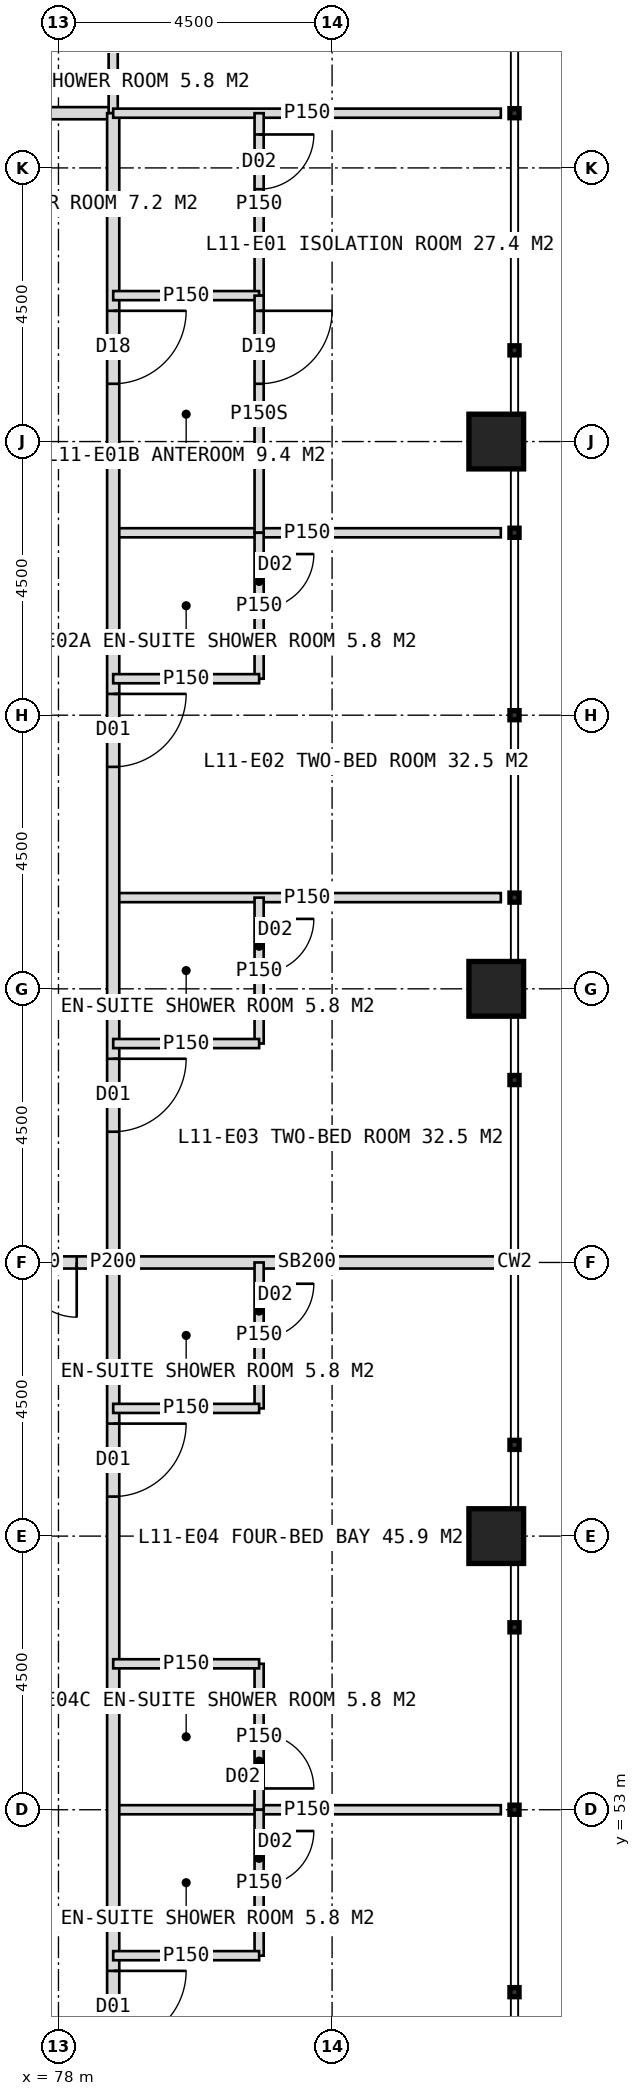
"""IFC4 building model, lengths in metres.
Left out: names, types, materials, properties, quantities, classifications, styles, units other than length and angle.
Written with IfcOpenShell. Run it as: python <this file> out.ifc"""

import sys

from ifc_helpers import new_model, si_unit, direction, frame, frame_2d, origin, origin_2d, place, context, subcontext, project, spatial, rectangle, hollow_rectangle, extrude, element, fill, save


model = new_model("IFC4")
c1 = context("Model", 3, precision=1e-05, world=origin(), true_north=direction((0.0, 1.0)))
c2 = subcontext(c1, "Body", "Model", "MODEL_VIEW")
j1 = project(units=[si_unit("LENGTHUNIT", "METRE"), si_unit("PLANEANGLEUNIT", "RADIAN")], contexts=[c1])
p1 = place(None, origin())
s1 = spatial("IfcSite", under=j1, at=p1, CompositionType="ELEMENT")
p2 = place(p1, origin())
s2 = spatial("IfcBuilding", under=s1, at=p2, CompositionType="ELEMENT")
p3 = place(p2, frame((0.0, 0.0, 51.0)))
s3 = spatial("IfcBuildingStorey", under=s2, at=p3, CompositionType="ELEMENT", Elevation=51.0)
for number, where, z_axis, x_axis in (
    (1, (85.2, 57.5, 0.0), (0.0, 0.0, 1.0), (1.0, 0.0, 0.0)),
    (2, (85.2, 66.5, 0.0), (0.0, 0.0, 1.0), (1.0, 0.0, 0.0)),
    (3, (85.2, 75.5, 0.0), (0.0, 0.0, 1.0), (1.0, 0.0, 0.0)),
):
    element("IfcColumn", number, at=place(p3, frame(where, z_axis=z_axis, x_axis=x_axis)), inside=s3, PredefinedType="COLUMN", context=c2, shape_type="SweptSolid", body=[
        extrude(hollow_rectangle(XDim=0.9, YDim=0.9, WallThickness=0.08, at=origin_2d()), origin(), (0.0, 0.0, 1.0), 4.0),
    ])
p4 = place(p3, frame((41.1, 80.9, 0.0), z_axis=(0.0, 0.0, 1.0), x_axis=(1.0, 0.0, 0.0)))
e4 = element("IfcWall", 4, at=p4, inside=s3, PredefinedType="PARTITIONING", context=c2, shape_type="SweptSolid", body=[
    extrude(rectangle(XDim=37.8, YDim=0.2, at=frame_2d((18.9, 0.0))), origin(), (0.0, 0.0, 1.0), 3.75),
])
p5 = place(p4, frame((3.25, 0.0, 0.0)))
e5 = element("IfcOpeningElement", 5, at=p5, cuts=e4, PredefinedType="OPENING", context=c2, shape_type="SweptSolid", body=[
    extrude(rectangle(XDim=1.2, YDim=2.2, at=frame_2d((0.6, 1.1))), frame((0.0, 0.11, 0.0), z_axis=(0.0, -1.0, 0.0), x_axis=(1.0, 0.0, 0.0)), (0.0, 0.0, 1.0), 0.22),
])
p6 = place(p4, frame((9.55, 0.0, 0.0)))
e6 = element("IfcOpeningElement", 6, at=p6, cuts=e4, PredefinedType="OPENING", context=c2, shape_type="SweptSolid", body=[
    extrude(rectangle(XDim=1.2, YDim=2.2, at=frame_2d((0.6, 1.1))), frame((0.0, 0.11, 0.0), z_axis=(0.0, -1.0, 0.0), x_axis=(1.0, 0.0, 0.0)), (0.0, 0.0, 1.0), 0.22),
])
p7 = place(p4, frame((15.55, 0.0, 0.0)))
e7 = element("IfcOpeningElement", 7, at=p7, cuts=e4, PredefinedType="OPENING", context=c2, shape_type="SweptSolid", body=[
    extrude(rectangle(XDim=1.2, YDim=2.2, at=frame_2d((0.6, 1.1))), frame((0.0, 0.11, 0.0), z_axis=(0.0, -1.0, 0.0), x_axis=(1.0, 0.0, 0.0)), (0.0, 0.0, 1.0), 0.22),
])
p8 = place(p4, frame((21.4, 0.0, 0.0)))
e8 = element("IfcOpeningElement", 8, at=p8, cuts=e4, PredefinedType="OPENING", context=c2, shape_type="SweptSolid", body=[
    extrude(rectangle(XDim=1.0, YDim=2.1, at=frame_2d((0.5, 1.05))), frame((0.0, 0.11, 0.0), z_axis=(0.0, -1.0, 0.0), x_axis=(1.0, 0.0, 0.0)), (0.0, 0.0, 1.0), 0.22),
])
p9 = place(p4, frame((27.55, 0.0, 0.0)))
e9 = element("IfcOpeningElement", 9, at=p9, cuts=e4, PredefinedType="OPENING", context=c2, shape_type="SweptSolid", body=[
    extrude(rectangle(XDim=1.2, YDim=2.2, at=frame_2d((0.6, 1.1))), frame((0.0, 0.11, 0.0), z_axis=(0.0, -1.0, 0.0), x_axis=(1.0, 0.0, 0.0)), (0.0, 0.0, 1.0), 0.22),
])
p10 = place(p3, frame((78.9, 80.9, 0.0), z_axis=(0.0, 0.0, 1.0), x_axis=(0.0, 1.0, 0.0)))
e10 = element("IfcWall", 10, at=p10, inside=s3, PredefinedType="PARTITIONING", context=c2, shape_type="SweptSolid", body=[
    extrude(rectangle(XDim=2.4, YDim=0.15, at=frame_2d((1.2, 0.0))), origin(), (0.0, 0.0, 1.0), 3.75),
])
for number, where, z_axis, x_axis in (
    (11, (78.9, 74.0, 0.0), (0.0, 0.0, 1.0), (1.0, 0.0, 0.0)),
    (12, (78.9, 68.0, 0.0), (0.0, 0.0, 1.0), (1.0, 0.0, 0.0)),
):
    element("IfcWall", number, at=place(p3, frame(where, z_axis=z_axis, x_axis=x_axis)), inside=s3, PredefinedType="PARTITIONING", context=c2, shape_type="SweptSolid", body=[
        extrude(rectangle(XDim=6.375, YDim=0.15, at=frame_2d((3.188, 0.0))), origin(), (0.0, 0.0, 1.0), 3.75),
    ])
p11 = place(p3, frame((78.9, 62.0, 0.0), z_axis=(0.0, 0.0, 1.0), x_axis=(1.0, 0.0, 0.0)))
e13 = element("IfcWall", 13, at=p11, inside=s3, PredefinedType="SOLIDWALL", context=c2, shape_type="SweptSolid", body=[
    extrude(rectangle(XDim=6.375, YDim=0.2, at=frame_2d((3.188, 0.0))), origin(), (0.0, 0.0, 1.0), 2.75),
])
p12 = place(p3, frame((78.9, 53.0, 0.0), z_axis=(0.0, 0.0, 1.0), x_axis=(1.0, 0.0, 0.0)))
e14 = element("IfcWall", 14, at=p12, inside=s3, PredefinedType="PARTITIONING", context=c2, shape_type="SweptSolid", body=[
    extrude(rectangle(XDim=6.375, YDim=0.15, at=frame_2d((3.188, 0.0))), origin(), (0.0, 0.0, 1.0), 3.75),
])
p13 = place(p3, frame((78.9, 80.9, 0.0), z_axis=(0.0, 0.0, 1.0), x_axis=(0.0, -1.0, 0.0)))
e15 = element("IfcWall", 15, at=p13, inside=s3, PredefinedType="PARTITIONING", context=c2, shape_type="SweptSolid", body=[
    extrude(rectangle(XDim=37.8, YDim=0.2, at=frame_2d((18.9, 0.0))), origin(), (0.0, 0.0, 1.0), 3.75),
])
p14 = place(p13, frame((3.25, 0.0, 0.0)))
e16 = element("IfcOpeningElement", 16, at=p14, cuts=e15, PredefinedType="OPENING", context=c2, shape_type="SweptSolid", body=[
    extrude(rectangle(XDim=1.2, YDim=2.2, at=frame_2d((0.6, 1.1))), frame((0.0, 0.11, 0.0), z_axis=(0.0, -1.0, 0.0), x_axis=(1.0, 0.0, 0.0)), (0.0, 0.0, 1.0), 0.22),
])
p15 = place(p13, frame((9.55, 0.0, 0.0)))
e17 = element("IfcOpeningElement", 17, at=p15, cuts=e15, PredefinedType="OPENING", context=c2, shape_type="SweptSolid", body=[
    extrude(rectangle(XDim=1.2, YDim=2.2, at=frame_2d((0.6, 1.1))), frame((0.0, 0.11, 0.0), z_axis=(0.0, -1.0, 0.0), x_axis=(1.0, 0.0, 0.0)), (0.0, 0.0, 1.0), 0.22),
])
p16 = place(p13, frame((15.55, 0.0, 0.0)))
e18 = element("IfcOpeningElement", 18, at=p16, cuts=e15, PredefinedType="OPENING", context=c2, shape_type="SweptSolid", body=[
    extrude(rectangle(XDim=1.2, YDim=2.2, at=frame_2d((0.6, 1.1))), frame((0.0, 0.11, 0.0), z_axis=(0.0, -1.0, 0.0), x_axis=(1.0, 0.0, 0.0)), (0.0, 0.0, 1.0), 0.22),
])
p17 = place(p13, frame((21.55, 0.0, 0.0)))
e19 = element("IfcOpeningElement", 19, at=p17, cuts=e15, PredefinedType="OPENING", context=c2, shape_type="SweptSolid", body=[
    extrude(rectangle(XDim=1.2, YDim=2.2, at=frame_2d((0.6, 1.1))), frame((0.0, 0.11, 0.0), z_axis=(0.0, -1.0, 0.0), x_axis=(1.0, 0.0, 0.0)), (0.0, 0.0, 1.0), 0.22),
])
p18 = place(p13, frame((30.55, 0.0, 0.0)))
e20 = element("IfcOpeningElement", 20, at=p18, cuts=e15, PredefinedType="OPENING", context=c2, shape_type="SweptSolid", body=[
    extrude(rectangle(XDim=1.2, YDim=2.2, at=frame_2d((0.6, 1.1))), frame((0.0, 0.11, 0.0), z_axis=(0.0, -1.0, 0.0), x_axis=(1.0, 0.0, 0.0)), (0.0, 0.0, 1.0), 0.22),
])
p19 = place(p3, frame((78.9, 80.9, 0.0), z_axis=(0.0, 0.0, 1.0), x_axis=(1.0, 0.0, 0.0)))
e21 = element("IfcWall", 21, at=p19, inside=s3, PredefinedType="PARTITIONING", context=c2, shape_type="SweptSolid", body=[
    extrude(rectangle(XDim=6.375, YDim=0.15, at=frame_2d((3.188, 0.0))), origin(), (0.0, 0.0, 1.0), 3.75),
])
p20 = place(p3, frame((81.3, 80.9, 0.0), z_axis=(0.0, 0.0, 1.0), x_axis=(0.0, -1.0, 0.0)))
e22 = element("IfcWall", 22, at=p20, inside=s3, PredefinedType="PARTITIONING", context=c2, shape_type="SweptSolid", body=[
    extrude(rectangle(XDim=3.0, YDim=0.15, at=frame_2d((1.5, 0.0))), origin(), (0.0, 0.0, 1.0), 3.75),
])
p21 = place(p20, frame((0.35, 0.0, 0.0)))
e23 = element("IfcOpeningElement", 23, at=p21, cuts=e22, PredefinedType="OPENING", context=c2, shape_type="SweptSolid", body=[
    extrude(rectangle(XDim=0.9, YDim=2.1, at=frame_2d((0.45, 1.05))), frame((0.0, 0.085, 0.0), z_axis=(0.0, -1.0, 0.0), x_axis=(1.0, 0.0, 0.0)), (0.0, 0.0, 1.0), 0.17),
])
p22 = place(p3, frame((78.9, 77.9, 0.0), z_axis=(0.0, 0.0, 1.0), x_axis=(1.0, 0.0, 0.0)))
e24 = element("IfcWall", 24, at=p22, inside=s3, PredefinedType="PARTITIONING", context=c2, shape_type="SweptSolid", body=[
    extrude(rectangle(XDim=2.4, YDim=0.15, at=frame_2d((1.2, 0.0))), origin(), (0.0, 0.0, 1.0), 3.75),
])
p23 = place(p3, frame((81.3, 77.9, 0.0), z_axis=(0.0, 0.0, 1.0), x_axis=(0.0, -1.0, 0.0)))
e25 = element("IfcWall", 25, at=p23, inside=s3, PredefinedType="PARTITIONING", context=c2, shape_type="SweptSolid", body=[
    extrude(rectangle(XDim=3.9, YDim=0.15, at=frame_2d((1.95, 0.0))), origin(), (0.0, 0.0, 1.0), 3.75),
])
p24 = place(p23, frame((0.25, 0.0, 0.0)))
e26 = element("IfcOpeningElement", 26, at=p24, cuts=e25, PredefinedType="OPENING", context=c2, shape_type="SweptSolid", body=[
    extrude(rectangle(XDim=1.2, YDim=2.2, at=frame_2d((0.6, 1.1))), frame((0.0, 0.085, 0.0), z_axis=(0.0, -1.0, 0.0), x_axis=(1.0, 0.0, 0.0)), (0.0, 0.0, 1.0), 0.17),
])
p25 = place(p3, frame((81.3, 74.0, 0.0), z_axis=(0.0, 0.0, 1.0), x_axis=(0.0, -1.0, 0.0)))
e27 = element("IfcWall", 27, at=p25, inside=s3, PredefinedType="PARTITIONING", context=c2, shape_type="SweptSolid", body=[
    extrude(rectangle(XDim=2.4, YDim=0.15, at=frame_2d((1.2, 0.0))), origin(), (0.0, 0.0, 1.0), 3.75),
])
p26 = place(p25, frame((0.35, 0.0, 0.0)))
e28 = element("IfcOpeningElement", 28, at=p26, cuts=e27, PredefinedType="OPENING", context=c2, shape_type="SweptSolid", body=[
    extrude(rectangle(XDim=0.9, YDim=2.1, at=frame_2d((0.45, 1.05))), frame((0.0, 0.085, 0.0), z_axis=(0.0, -1.0, 0.0), x_axis=(1.0, 0.0, 0.0)), (0.0, 0.0, 1.0), 0.17),
])
p27 = place(p3, frame((78.9, 71.6, 0.0), z_axis=(0.0, 0.0, 1.0), x_axis=(1.0, 0.0, 0.0)))
e29 = element("IfcWall", 29, at=p27, inside=s3, PredefinedType="PARTITIONING", context=c2, shape_type="SweptSolid", body=[
    extrude(rectangle(XDim=2.4, YDim=0.15, at=frame_2d((1.2, 0.0))), origin(), (0.0, 0.0, 1.0), 3.75),
])
p28 = place(p3, frame((81.3, 68.0, 0.0), z_axis=(0.0, 0.0, 1.0), x_axis=(0.0, -1.0, 0.0)))
e30 = element("IfcWall", 30, at=p28, inside=s3, PredefinedType="PARTITIONING", context=c2, shape_type="SweptSolid", body=[
    extrude(rectangle(XDim=2.4, YDim=0.15, at=frame_2d((1.2, 0.0))), origin(), (0.0, 0.0, 1.0), 3.75),
])
p29 = place(p28, frame((0.35, 0.0, 0.0)))
e31 = element("IfcOpeningElement", 31, at=p29, cuts=e30, PredefinedType="OPENING", context=c2, shape_type="SweptSolid", body=[
    extrude(rectangle(XDim=0.9, YDim=2.1, at=frame_2d((0.45, 1.05))), frame((0.0, 0.085, 0.0), z_axis=(0.0, -1.0, 0.0), x_axis=(1.0, 0.0, 0.0)), (0.0, 0.0, 1.0), 0.17),
])
p30 = place(p3, frame((78.9, 65.6, 0.0), z_axis=(0.0, 0.0, 1.0), x_axis=(1.0, 0.0, 0.0)))
e32 = element("IfcWall", 32, at=p30, inside=s3, PredefinedType="PARTITIONING", context=c2, shape_type="SweptSolid", body=[
    extrude(rectangle(XDim=2.4, YDim=0.15, at=frame_2d((1.2, 0.0))), origin(), (0.0, 0.0, 1.0), 3.75),
])
p31 = place(p3, frame((81.3, 62.0, 0.0), z_axis=(0.0, 0.0, 1.0), x_axis=(0.0, -1.0, 0.0)))
e33 = element("IfcWall", 33, at=p31, inside=s3, PredefinedType="PARTITIONING", context=c2, shape_type="SweptSolid", body=[
    extrude(rectangle(XDim=2.4, YDim=0.15, at=frame_2d((1.2, 0.0))), origin(), (0.0, 0.0, 1.0), 3.75),
])
p32 = place(p31, frame((0.35, 0.0, 0.0)))
e34 = element("IfcOpeningElement", 34, at=p32, cuts=e33, PredefinedType="OPENING", context=c2, shape_type="SweptSolid", body=[
    extrude(rectangle(XDim=0.9, YDim=2.1, at=frame_2d((0.45, 1.05))), frame((0.0, 0.085, 0.0), z_axis=(0.0, -1.0, 0.0), x_axis=(1.0, 0.0, 0.0)), (0.0, 0.0, 1.0), 0.17),
])
p33 = place(p3, frame((78.9, 59.6, 0.0), z_axis=(0.0, 0.0, 1.0), x_axis=(1.0, 0.0, 0.0)))
e35 = element("IfcWall", 35, at=p33, inside=s3, PredefinedType="PARTITIONING", context=c2, shape_type="SweptSolid", body=[
    extrude(rectangle(XDim=2.4, YDim=0.15, at=frame_2d((1.2, 0.0))), origin(), (0.0, 0.0, 1.0), 3.75),
])
p34 = place(p3, frame((81.3, 55.4, 0.0), z_axis=(0.0, 0.0, 1.0), x_axis=(0.0, -1.0, 0.0)))
e36 = element("IfcWall", 36, at=p34, inside=s3, PredefinedType="PARTITIONING", context=c2, shape_type="SweptSolid", body=[
    extrude(rectangle(XDim=2.4, YDim=0.15, at=frame_2d((1.2, 0.0))), origin(), (0.0, 0.0, 1.0), 3.75),
])
p35 = place(p34, frame((1.15, 0.0, 0.0)))
e37 = element("IfcOpeningElement", 37, at=p35, cuts=e36, PredefinedType="OPENING", context=c2, shape_type="SweptSolid", body=[
    extrude(rectangle(XDim=0.9, YDim=2.1, at=frame_2d((0.45, 1.05))), frame((0.0, 0.085, 0.0), z_axis=(0.0, -1.0, 0.0), x_axis=(1.0, 0.0, 0.0)), (0.0, 0.0, 1.0), 0.17),
])
p36 = place(p3, frame((78.9, 55.4, 0.0), z_axis=(0.0, 0.0, 1.0), x_axis=(1.0, 0.0, 0.0)))
e38 = element("IfcWall", 38, at=p36, inside=s3, PredefinedType="PARTITIONING", context=c2, shape_type="SweptSolid", body=[
    extrude(rectangle(XDim=2.4, YDim=0.15, at=frame_2d((1.2, 0.0))), origin(), (0.0, 0.0, 1.0), 3.75),
])
p37 = place(p3, frame((81.3, 53.0, 0.0), z_axis=(0.0, 0.0, 1.0), x_axis=(0.0, -1.0, 0.0)))
e39 = element("IfcWall", 39, at=p37, inside=s3, PredefinedType="PARTITIONING", context=c2, shape_type="SweptSolid", body=[
    extrude(rectangle(XDim=2.4, YDim=0.15, at=frame_2d((1.2, 0.0))), origin(), (0.0, 0.0, 1.0), 3.75),
])
p38 = place(p37, frame((0.35, 0.0, 0.0)))
e40 = element("IfcOpeningElement", 40, at=p38, cuts=e39, PredefinedType="OPENING", context=c2, shape_type="SweptSolid", body=[
    extrude(rectangle(XDim=0.9, YDim=2.1, at=frame_2d((0.45, 1.05))), frame((0.0, 0.085, 0.0), z_axis=(0.0, -1.0, 0.0), x_axis=(1.0, 0.0, 0.0)), (0.0, 0.0, 1.0), 0.17),
])
p39 = place(p3, frame((78.9, 50.6, 0.0), z_axis=(0.0, 0.0, 1.0), x_axis=(1.0, 0.0, 0.0)))
e41 = element("IfcWall", 41, at=p39, inside=s3, PredefinedType="PARTITIONING", context=c2, shape_type="SweptSolid", body=[
    extrude(rectangle(XDim=2.4, YDim=0.15, at=frame_2d((1.2, 0.0))), origin(), (0.0, 0.0, 1.0), 3.75),
])
p40 = place(p3, frame((76.2, 62.0, 0.0), z_axis=(0.0, 0.0, 1.0), x_axis=(1.0, 0.0, 0.0)))
e42 = element("IfcWall", 42, at=p40, inside=s3, PredefinedType="SOLIDWALL", context=c2, shape_type="SweptSolid", body=[
    extrude(rectangle(XDim=2.7, YDim=0.2, at=frame_2d((1.35, 0.0))), origin(), (0.0, 0.0, 1.0), 2.75),
])
p41 = place(p40, frame((0.3, 0.0, 0.0)))
e43 = element("IfcOpeningElement", 43, at=p41, cuts=e42, PredefinedType="OPENING", context=c2, shape_type="SweptSolid", body=[
    extrude(rectangle(XDim=1.8, YDim=2.2, at=frame_2d((0.9, 1.1))), frame((0.0, 0.11, 0.0), z_axis=(0.0, -1.0, 0.0), x_axis=(1.0, 0.0, 0.0)), (0.0, 0.0, 1.0), 0.22),
])
p42 = place(p24, origin())
e44 = element("IfcDoor", 44, at=p42, inside=s3, OperationType="SINGLE_SWING_LEFT", PredefinedType="DOOR", context=c2, shape_type="SweptSolid", body=[
    extrude(rectangle(XDim=1.2, YDim=2.2, at=frame_2d((0.6, 1.1))), frame((0.0, 0.025, 0.0), z_axis=(0.0, -1.0, 0.0), x_axis=(1.0, 0.0, 0.0)), (0.0, 0.0, 1.0), 0.05),
])
fill(e26, e44)
p43 = place(p14, origin())
e45 = element("IfcDoor", 45, at=p43, inside=s3, OperationType="SINGLE_SWING_LEFT", PredefinedType="DOOR", context=c2, shape_type="SweptSolid", body=[
    extrude(rectangle(XDim=1.2, YDim=2.2, at=frame_2d((0.6, 1.1))), frame((0.0, 0.025, 0.0), z_axis=(0.0, -1.0, 0.0), x_axis=(1.0, 0.0, 0.0)), (0.0, 0.0, 1.0), 0.05),
])
fill(e16, e45)
p44 = place(p21, origin())
e46 = element("IfcDoor", 46, at=p44, inside=s3, OperationType="SINGLE_SWING_LEFT", PredefinedType="DOOR", context=c2, shape_type="SweptSolid", body=[
    extrude(rectangle(XDim=0.9, YDim=2.1, at=frame_2d((0.45, 1.05))), frame((0.0, 0.025, 0.0), z_axis=(0.0, -1.0, 0.0), x_axis=(1.0, 0.0, 0.0)), (0.0, 0.0, 1.0), 0.05),
])
fill(e23, e46)
p45 = place(p15, origin())
e47 = element("IfcDoor", 47, at=p45, inside=s3, OperationType="SINGLE_SWING_LEFT", PredefinedType="DOOR", context=c2, shape_type="SweptSolid", body=[
    extrude(rectangle(XDim=1.2, YDim=2.2, at=frame_2d((0.6, 1.1))), frame((0.0, 0.025, 0.0), z_axis=(0.0, -1.0, 0.0), x_axis=(1.0, 0.0, 0.0)), (0.0, 0.0, 1.0), 0.05),
])
fill(e17, e47)
p46 = place(p26, origin())
e48 = element("IfcDoor", 48, at=p46, inside=s3, OperationType="SINGLE_SWING_LEFT", PredefinedType="DOOR", context=c2, shape_type="SweptSolid", body=[
    extrude(rectangle(XDim=0.9, YDim=2.1, at=frame_2d((0.45, 1.05))), frame((0.0, 0.025, 0.0), z_axis=(0.0, -1.0, 0.0), x_axis=(1.0, 0.0, 0.0)), (0.0, 0.0, 1.0), 0.05),
])
fill(e28, e48)
p47 = place(p16, origin())
e49 = element("IfcDoor", 49, at=p47, inside=s3, OperationType="SINGLE_SWING_LEFT", PredefinedType="DOOR", context=c2, shape_type="SweptSolid", body=[
    extrude(rectangle(XDim=1.2, YDim=2.2, at=frame_2d((0.6, 1.1))), frame((0.0, 0.025, 0.0), z_axis=(0.0, -1.0, 0.0), x_axis=(1.0, 0.0, 0.0)), (0.0, 0.0, 1.0), 0.05),
])
fill(e18, e49)
p48 = place(p29, origin())
e50 = element("IfcDoor", 50, at=p48, inside=s3, OperationType="SINGLE_SWING_LEFT", PredefinedType="DOOR", context=c2, shape_type="SweptSolid", body=[
    extrude(rectangle(XDim=0.9, YDim=2.1, at=frame_2d((0.45, 1.05))), frame((0.0, 0.025, 0.0), z_axis=(0.0, -1.0, 0.0), x_axis=(1.0, 0.0, 0.0)), (0.0, 0.0, 1.0), 0.05),
])
fill(e31, e50)
p49 = place(p17, origin())
e51 = element("IfcDoor", 51, at=p49, inside=s3, OperationType="SINGLE_SWING_LEFT", PredefinedType="DOOR", context=c2, shape_type="SweptSolid", body=[
    extrude(rectangle(XDim=1.2, YDim=2.2, at=frame_2d((0.6, 1.1))), frame((0.0, 0.025, 0.0), z_axis=(0.0, -1.0, 0.0), x_axis=(1.0, 0.0, 0.0)), (0.0, 0.0, 1.0), 0.05),
])
fill(e19, e51)
p50 = place(p32, origin())
e52 = element("IfcDoor", 52, at=p50, inside=s3, OperationType="SINGLE_SWING_LEFT", PredefinedType="DOOR", context=c2, shape_type="SweptSolid", body=[
    extrude(rectangle(XDim=0.9, YDim=2.1, at=frame_2d((0.45, 1.05))), frame((0.0, 0.025, 0.0), z_axis=(0.0, -1.0, 0.0), x_axis=(1.0, 0.0, 0.0)), (0.0, 0.0, 1.0), 0.05),
])
fill(e34, e52)
p51 = place(p35, origin())
e53 = element("IfcDoor", 53, at=p51, inside=s3, OperationType="SINGLE_SWING_RIGHT", PredefinedType="DOOR", context=c2, shape_type="SweptSolid", body=[
    extrude(rectangle(XDim=0.9, YDim=2.1, at=frame_2d((0.45, 1.05))), frame((0.0, 0.025, 0.0), z_axis=(0.0, -1.0, 0.0), x_axis=(1.0, 0.0, 0.0)), (0.0, 0.0, 1.0), 0.05),
])
fill(e37, e53)
p52 = place(p18, origin())
e54 = element("IfcDoor", 54, at=p52, inside=s3, OperationType="SINGLE_SWING_LEFT", PredefinedType="DOOR", context=c2, shape_type="SweptSolid", body=[
    extrude(rectangle(XDim=1.2, YDim=2.2, at=frame_2d((0.6, 1.1))), frame((0.0, 0.025, 0.0), z_axis=(0.0, -1.0, 0.0), x_axis=(1.0, 0.0, 0.0)), (0.0, 0.0, 1.0), 0.05),
])
fill(e20, e54)
p53 = place(p38, origin())
e55 = element("IfcDoor", 55, at=p53, inside=s3, OperationType="SINGLE_SWING_LEFT", PredefinedType="DOOR", context=c2, shape_type="SweptSolid", body=[
    extrude(rectangle(XDim=0.9, YDim=2.1, at=frame_2d((0.45, 1.05))), frame((0.0, 0.025, 0.0), z_axis=(0.0, -1.0, 0.0), x_axis=(1.0, 0.0, 0.0)), (0.0, 0.0, 1.0), 0.05),
])
fill(e40, e55)
p54 = place(p41, origin())
e56 = element("IfcDoor", 56, at=p54, inside=s3, OperationType="DOUBLE_DOOR_DOUBLE_SWING", PredefinedType="DOOR", context=c2, shape_type="SweptSolid", body=[
    extrude(rectangle(XDim=1.8, YDim=2.2, at=frame_2d((0.9, 1.1))), frame((0.0, 0.025, 0.0), z_axis=(0.0, -1.0, 0.0), x_axis=(1.0, 0.0, 0.0)), (0.0, 0.0, 1.0), 0.05),
])
fill(e43, e56)
save(model, sys.argv[1])
